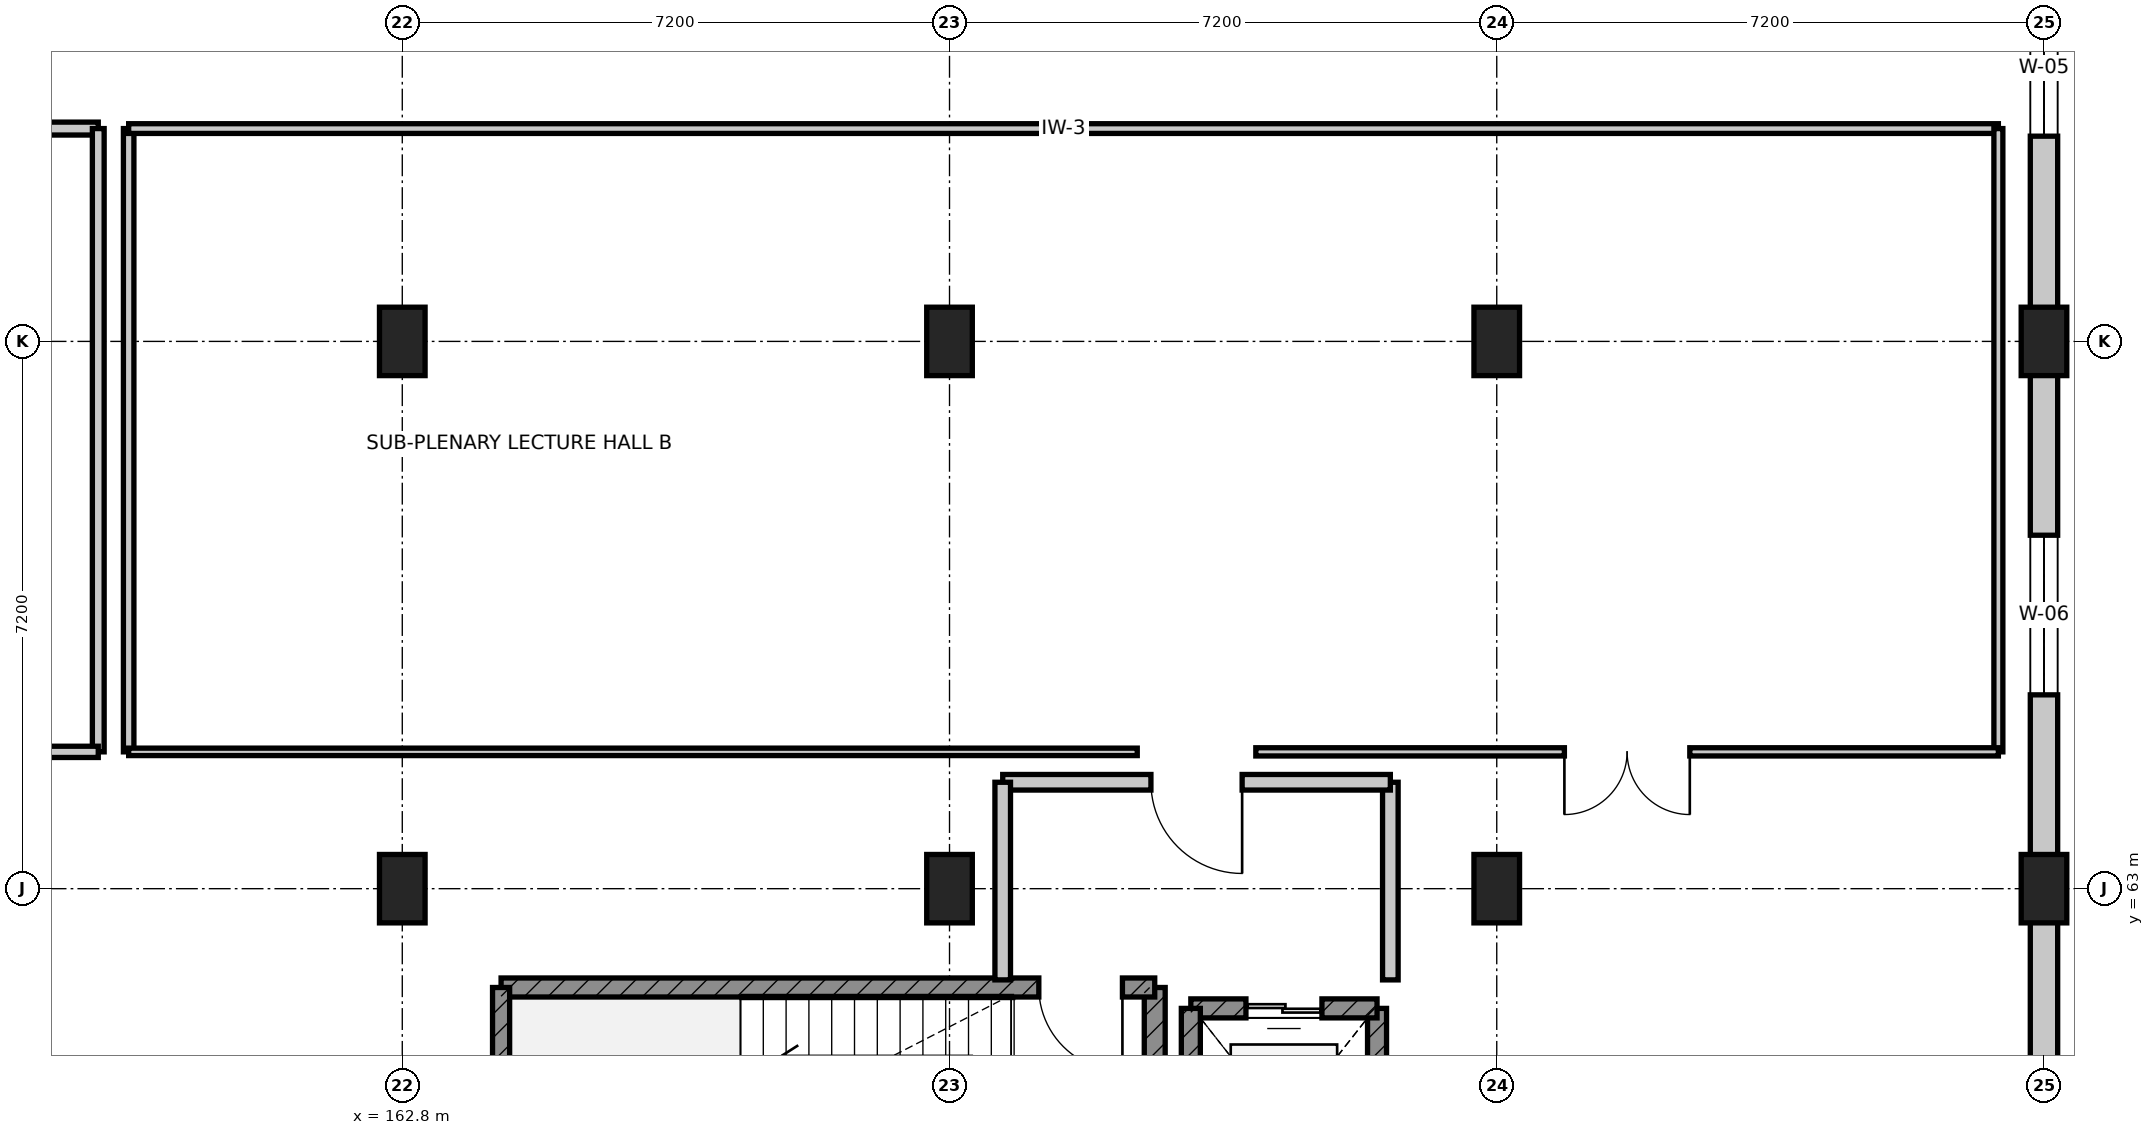
"""IFC4 building model, lengths in metres.
Left out: names, types, materials, properties, quantities, classifications, styles, units other than length and angle.
Written with IfcOpenShell. Run it as: python <this file> out.ifc"""

import sys

from ifc_helpers import new_model, si_unit, direction, frame, frame_2d, origin, origin_2d, place, context, subcontext, project, spatial, rectangle, extrude, element, fill, save


model = new_model("IFC4")
c1 = context("Model", 3, precision=1e-05, world=origin(), true_north=direction((0.0, 1.0)))
c2 = subcontext(c1, "Body", "Model", "MODEL_VIEW")
j1 = project(units=[si_unit("LENGTHUNIT", "METRE"), si_unit("PLANEANGLEUNIT", "RADIAN")], contexts=[c1])
p1 = place(None, origin())
s1 = spatial("IfcSite", under=j1, at=p1, CompositionType="ELEMENT")
p2 = place(p1, origin())
s2 = spatial("IfcBuilding", under=s1, at=p2, CompositionType="ELEMENT")
p3 = place(p2, frame((0.0, 0.0, 10.5)))
s3 = spatial("IfcBuildingStorey", under=s2, at=p3, CompositionType="ELEMENT", Elevation=10.5)
for number, where, z_axis, x_axis in (
    (1, (162.8, 63.0, 0.0), (0.0, 0.0, 1.0), (1.0, 0.0, 0.0)),
    (2, (162.8, 70.2, 0.0), (0.0, 0.0, 1.0), (1.0, 0.0, 0.0)),
    (3, (170.0, 63.0, 0.0), (0.0, 0.0, 1.0), (1.0, 0.0, 0.0)),
    (4, (170.0, 70.2, 0.0), (0.0, 0.0, 1.0), (1.0, 0.0, 0.0)),
    (5, (177.2, 63.0, 0.0), (0.0, 0.0, 1.0), (1.0, 0.0, 0.0)),
    (6, (177.2, 70.2, 0.0), (0.0, 0.0, 1.0), (1.0, 0.0, 0.0)),
    (7, (184.4, 63.0, 0.0), (0.0, 0.0, 1.0), (1.0, 0.0, 0.0)),
    (8, (184.4, 70.2, 0.0), (0.0, 0.0, 1.0), (1.0, 0.0, 0.0)),
):
    element("IfcColumn", number, at=place(p3, frame(where, z_axis=z_axis, x_axis=x_axis)), inside=s3, PredefinedType="COLUMN", context=c2, shape_type="SweptSolid", body=[
        extrude(rectangle(XDim=0.6, YDim=0.9, at=origin_2d()), origin(), (0.0, 0.0, 1.0), 4.5),
    ])
p4 = place(p3, frame((184.4, 77.4, 0.0), z_axis=(0.0, 0.0, 1.0), x_axis=(0.0, -1.0, 0.0)))
e9 = element("IfcWall", 9, at=p4, inside=s3, PredefinedType="STANDARD", context=c2, shape_type="SweptSolid", body=[
    extrude(rectangle(XDim=7.2, YDim=0.36, at=frame_2d((3.6, 0.0))), origin(), (0.0, 0.0, 1.0), 3.898),
])
p5 = place(p4, frame((2.7, 0.0, 0.9)))
e10 = element("IfcOpeningElement", 10, at=p5, cuts=e9, PredefinedType="OPENING", context=c2, shape_type="SweptSolid", body=[
    extrude(rectangle(XDim=1.8, YDim=1.8, at=frame_2d((0.9, 0.9))), frame((0.0, 0.19, 0.0), z_axis=(0.0, -1.0, 0.0), x_axis=(1.0, 0.0, 0.0)), (0.0, 0.0, 1.0), 0.38),
])
p6 = place(p3, frame((184.4, 70.2, 0.0), z_axis=(0.0, 0.0, 1.0), x_axis=(0.0, -1.0, 0.0)))
e11 = element("IfcWall", 11, at=p6, inside=s3, PredefinedType="STANDARD", context=c2, shape_type="SweptSolid", body=[
    extrude(rectangle(XDim=7.2, YDim=0.36, at=frame_2d((3.6, 0.0))), origin(), (0.0, 0.0, 1.0), 3.898),
])
p7 = place(p6, frame((2.55, 0.0, 0.9)))
e12 = element("IfcOpeningElement", 12, at=p7, cuts=e11, PredefinedType="OPENING", context=c2, shape_type="SweptSolid", body=[
    extrude(rectangle(XDim=2.1, YDim=1.8, at=frame_2d((1.05, 0.9))), frame((0.0, 0.19, 0.0), z_axis=(0.0, -1.0, 0.0), x_axis=(1.0, 0.0, 0.0)), (0.0, 0.0, 1.0), 0.38),
])
p8 = place(p3, frame((184.4, 63.0, 0.0), z_axis=(0.0, 0.0, 1.0), x_axis=(0.0, -1.0, 0.0)))
e13 = element("IfcWall", 13, at=p8, inside=s3, PredefinedType="STANDARD", context=c2, shape_type="SweptSolid", body=[
    extrude(rectangle(XDim=7.2, YDim=0.36, at=frame_2d((3.6, 0.0))), origin(), (0.0, 0.0, 1.0), 3.745),
])
p9 = place(p8, frame((2.4, 0.0, 0.9)))
e14 = element("IfcOpeningElement", 14, at=p9, cuts=e13, PredefinedType="OPENING", context=c2, shape_type="SweptSolid", body=[
    extrude(rectangle(XDim=2.4, YDim=1.8, at=frame_2d((1.2, 0.9))), frame((0.0, 0.19, 0.0), z_axis=(0.0, -1.0, 0.0), x_axis=(1.0, 0.0, 0.0)), (0.0, 0.0, 1.0), 0.38),
])
p10 = place(p3, frame((172.7, 58.1, 0.0), z_axis=(0.0, 0.0, 1.0), x_axis=(0.0, 1.0, 0.0)))
e15 = element("IfcWall", 15, at=p10, inside=s3, PredefinedType="SHEAR", context=c2, shape_type="SweptSolid", body=[
    extrude(rectangle(XDim=3.6, YDim=0.275, at=frame_2d((1.8, 0.0))), origin(), (0.0, 0.0, 1.0), 4.22),
])
p11 = place(p3, frame((172.7, 61.7, 0.0), z_axis=(0.0, 0.0, 1.0), x_axis=(-1.0, 0.0, 0.0)))
e16 = element("IfcWall", 16, at=p11, inside=s3, PredefinedType="SHEAR", context=c2, shape_type="SweptSolid", body=[
    extrude(rectangle(XDim=8.6, YDim=0.25, at=frame_2d((4.3, 0.0))), origin(), (0.0, 0.0, 1.0), 4.22),
])
p12 = place(p11, frame((0.425, 0.0, 0.0)))
e17 = element("IfcOpeningElement", 17, at=p12, cuts=e16, PredefinedType="OPENING", context=c2, shape_type="SweptSolid", body=[
    extrude(rectangle(XDim=1.1, YDim=2.1, at=frame_2d((0.55, 1.05))), frame((0.0, 0.135, 0.0), z_axis=(0.0, -1.0, 0.0), x_axis=(1.0, 0.0, 0.0)), (0.0, 0.0, 1.0), 0.27),
])
p13 = place(p3, frame((164.1, 61.7, 0.0), z_axis=(0.0, 0.0, 1.0), x_axis=(0.0, -1.0, 0.0)))
e18 = element("IfcWall", 18, at=p13, inside=s3, PredefinedType="SHEAR", context=c2, shape_type="SweptSolid", body=[
    extrude(rectangle(XDim=3.6, YDim=0.225, at=frame_2d((1.8, 0.0))), origin(), (0.0, 0.0, 1.0), 4.22),
])
p14 = place(p3, frame((175.625, 58.375, 0.0), z_axis=(0.0, 0.0, 1.0), x_axis=(0.0, 1.0, 0.0)))
e19 = element("IfcWall", 19, at=p14, inside=s3, PredefinedType="SHEAR", context=c2, shape_type="SweptSolid", body=[
    extrude(rectangle(XDim=3.05, YDim=0.25, at=frame_2d((1.525, 0.0))), origin(), (0.0, 0.0, 1.0), 4.22),
])
p15 = place(p3, frame((175.625, 61.425, 0.0), z_axis=(0.0, 0.0, 1.0), x_axis=(-1.0, 0.0, 0.0)))
e20 = element("IfcWall", 20, at=p15, inside=s3, PredefinedType="SHEAR", context=c2, shape_type="SweptSolid", body=[
    extrude(rectangle(XDim=2.45, YDim=0.25, at=frame_2d((1.225, 0.0))), origin(), (0.0, 0.0, 1.0), 4.22),
])
p16 = place(p15, frame((0.725, 0.0, 0.0)))
e21 = element("IfcOpeningElement", 21, at=p16, cuts=e20, PredefinedType="OPENING", context=c2, shape_type="SweptSolid", body=[
    extrude(rectangle(XDim=1.0, YDim=2.15, at=frame_2d((0.5, 1.075))), frame((0.0, 0.135, 0.0), z_axis=(0.0, -1.0, 0.0), x_axis=(1.0, 0.0, 0.0)), (0.0, 0.0, 1.0), 0.27),
])
p17 = place(p3, frame((173.175, 61.425, 0.0), z_axis=(0.0, 0.0, 1.0), x_axis=(0.0, -1.0, 0.0)))
e22 = element("IfcWall", 22, at=p17, inside=s3, PredefinedType="SHEAR", context=c2, shape_type="SweptSolid", body=[
    extrude(rectangle(XDim=3.05, YDim=0.25, at=frame_2d((1.525, 0.0))), origin(), (0.0, 0.0, 1.0), 4.22),
])
p18 = place(p3, frame((175.8, 61.8, 0.0), z_axis=(0.0, 0.0, 1.0), x_axis=(0.0, 1.0, 0.0)))
e23 = element("IfcWall", 23, at=p18, inside=s3, PredefinedType="PARTITIONING", context=c2, shape_type="SweptSolid", body=[
    extrude(rectangle(XDim=2.6, YDim=0.205, at=frame_2d((1.3, 0.0))), origin(), (0.0, 0.0, 1.0), 3.555),
])
p19 = place(p3, frame((175.8, 64.4, 0.0), z_axis=(0.0, 0.0, 1.0), x_axis=(-1.0, 0.0, 0.0)))
e24 = element("IfcWall", 24, at=p19, inside=s3, PredefinedType="PARTITIONING", context=c2, shape_type="SweptSolid", body=[
    extrude(rectangle(XDim=5.1, YDim=0.205, at=frame_2d((2.55, 0.0))), origin(), (0.0, 0.0, 1.0), 4.22),
])
p20 = place(p19, frame((1.95, 0.0, 0.0)))
e25 = element("IfcOpeningElement", 25, at=p20, cuts=e24, PredefinedType="OPENING", context=c2, shape_type="SweptSolid", body=[
    extrude(rectangle(XDim=1.2, YDim=2.1, at=frame_2d((0.6, 1.05))), frame((0.0, 0.113, 0.0), z_axis=(0.0, -1.0, 0.0), x_axis=(1.0, 0.0, 0.0)), (0.0, 0.0, 1.0), 0.225),
])
p21 = place(p3, frame((170.7, 64.4, 0.0), z_axis=(0.0, 0.0, 1.0), x_axis=(0.0, -1.0, 0.0)))
e26 = element("IfcWall", 26, at=p21, inside=s3, PredefinedType="PARTITIONING", context=c2, shape_type="SweptSolid", body=[
    extrude(rectangle(XDim=2.6, YDim=0.205, at=frame_2d((1.3, 0.0))), origin(), (0.0, 0.0, 1.0), 3.555),
])
p22 = place(p3, frame((134.2, 73.0, 0.0), z_axis=(0.0, 0.0, 1.0), x_axis=(1.0, 0.0, 0.0)))
e27 = element("IfcWall", 27, at=p22, inside=s3, PredefinedType="PARTITIONING", context=c2, shape_type="SweptSolid", body=[
    extrude(rectangle(XDim=24.6, YDim=0.17, at=frame_2d((12.3, 0.0))), origin(), (0.0, 0.0, 1.0), 3.796),
])
p23 = place(p3, frame((158.8, 73.0, 0.0), z_axis=(0.0, 0.0, 1.0), x_axis=(0.0, -1.0, 0.0)))
e28 = element("IfcWall", 28, at=p23, inside=s3, PredefinedType="PARTITIONING", context=c2, shape_type="SweptSolid", body=[
    extrude(rectangle(XDim=8.2, YDim=0.155, at=frame_2d((4.1, 0.0))), origin(), (0.0, 0.0, 1.0), 3.555),
])
p24 = place(p3, frame((158.8, 64.8, 0.0), z_axis=(0.0, 0.0, 1.0), x_axis=(-1.0, 0.0, 0.0)))
e29 = element("IfcWall", 29, at=p24, inside=s3, PredefinedType="PARTITIONING", context=c2, shape_type="SweptSolid", body=[
    extrude(rectangle(XDim=24.6, YDim=0.148, at=frame_2d((12.3, 0.0))), origin(), (0.0, 0.0, 1.0), 3.796),
])
p25 = place(p3, frame((159.2, 64.8, 0.0), z_axis=(0.0, 0.0, 1.0), x_axis=(0.0, 1.0, 0.0)))
e30 = element("IfcWall", 30, at=p25, inside=s3, PredefinedType="PARTITIONING", context=c2, shape_type="SweptSolid", body=[
    extrude(rectangle(XDim=8.2, YDim=0.138, at=frame_2d((4.1, 0.0))), origin(), (0.0, 0.0, 1.0), 3.555),
])
p26 = place(p3, frame((159.2, 73.0, 0.0), z_axis=(0.0, 0.0, 1.0), x_axis=(1.0, 0.0, 0.0)))
e31 = element("IfcWall", 31, at=p26, inside=s3, PredefinedType="PARTITIONING", context=c2, shape_type="SweptSolid", body=[
    extrude(rectangle(XDim=24.6, YDim=0.128, at=frame_2d((12.3, 0.0))), origin(), (0.0, 0.0, 1.0), 3.796),
])
p27 = place(p3, frame((183.8, 73.0, 0.0), z_axis=(0.0, 0.0, 1.0), x_axis=(0.0, -1.0, 0.0)))
e32 = element("IfcWall", 32, at=p27, inside=s3, PredefinedType="PARTITIONING", context=c2, shape_type="SweptSolid", body=[
    extrude(rectangle(XDim=8.2, YDim=0.118, at=frame_2d((4.1, 0.0))), origin(), (0.0, 0.0, 1.0), 3.555),
])
p28 = place(p3, frame((183.8, 64.8, 0.0), z_axis=(0.0, 0.0, 1.0), x_axis=(-1.0, 0.0, 0.0)))
e33 = element("IfcWall", 33, at=p28, inside=s3, PredefinedType="PARTITIONING", context=c2, shape_type="SweptSolid", body=[
    extrude(rectangle(XDim=9.77, YDim=0.108, at=frame_2d((4.885, 0.0))), origin(), (0.0, 0.0, 1.0), 3.796),
])
p29 = place(p28, frame((4.06, 0.0, 0.0)))
e34 = element("IfcOpeningElement", 34, at=p29, cuts=e33, PredefinedType="OPENING", context=c2, shape_type="SweptSolid", body=[
    extrude(rectangle(XDim=1.65, YDim=2.25, at=frame_2d((0.825, 1.125))), frame((0.0, 0.064, 0.0), z_axis=(0.0, -1.0, 0.0), x_axis=(1.0, 0.0, 0.0)), (0.0, 0.0, 1.0), 0.128),
])
p30 = place(p3, frame((172.47, 64.8, 0.0), z_axis=(0.0, 0.0, 1.0), x_axis=(-1.0, 0.0, 0.0)))
e35 = element("IfcWall", 35, at=p30, inside=s3, PredefinedType="PARTITIONING", context=c2, shape_type="SweptSolid", body=[
    extrude(rectangle(XDim=13.27, YDim=0.098, at=frame_2d((6.635, 0.0))), origin(), (0.0, 0.0, 1.0), 3.796),
])
p31 = place(p5, origin())
e36 = element("IfcWindow", 36, at=p31, inside=s3, PartitioningType="SINGLE_PANEL", PredefinedType="WINDOW", context=c2, shape_type="SweptSolid", body=[
    extrude(rectangle(XDim=1.8, YDim=1.8, at=frame_2d((0.9, 0.9))), frame((0.0, 0.03, 0.0), z_axis=(0.0, -1.0, 0.0), x_axis=(1.0, 0.0, 0.0)), (0.0, 0.0, 1.0), 0.06),
])
fill(e10, e36)
p32 = place(p7, origin())
e37 = element("IfcWindow", 37, at=p32, inside=s3, PartitioningType="SINGLE_PANEL", PredefinedType="WINDOW", context=c2, shape_type="SweptSolid", body=[
    extrude(rectangle(XDim=2.1, YDim=1.8, at=frame_2d((1.05, 0.9))), frame((0.0, 0.03, 0.0), z_axis=(0.0, -1.0, 0.0), x_axis=(1.0, 0.0, 0.0)), (0.0, 0.0, 1.0), 0.06),
])
fill(e12, e37)
p33 = place(p12, origin())
e38 = element("IfcDoor", 38, at=p33, inside=s3, OperationType="SINGLE_SWING_LEFT", PredefinedType="DOOR", context=c2, shape_type="SweptSolid", body=[
    extrude(rectangle(XDim=1.1, YDim=2.1, at=frame_2d((0.55, 1.05))), frame((0.0, 0.025, 0.0), z_axis=(0.0, -1.0, 0.0), x_axis=(1.0, 0.0, 0.0)), (0.0, 0.0, 1.0), 0.05),
])
fill(e17, e38)
p34 = place(p16, origin())
e39 = element("IfcDoor", 39, at=p34, inside=s3, OperationType="DOUBLE_DOOR_SLIDING", PredefinedType="DOOR", context=c2, shape_type="SweptSolid", body=[
    extrude(rectangle(XDim=1.0, YDim=2.15, at=frame_2d((0.5, 1.075))), frame((0.0, 0.025, 0.0), z_axis=(0.0, -1.0, 0.0), x_axis=(1.0, 0.0, 0.0)), (0.0, 0.0, 1.0), 0.05),
])
fill(e21, e39)
p35 = place(p20, origin())
e40 = element("IfcDoor", 40, at=p35, inside=s3, OperationType="SINGLE_SWING_LEFT", PredefinedType="DOOR", context=c2, shape_type="SweptSolid", body=[
    extrude(rectangle(XDim=1.2, YDim=2.1, at=frame_2d((0.6, 1.05))), frame((0.0, 0.025, 0.0), z_axis=(0.0, -1.0, 0.0), x_axis=(1.0, 0.0, 0.0)), (0.0, 0.0, 1.0), 0.05),
])
fill(e25, e40)
p36 = place(p29, origin())
e41 = element("IfcDoor", 41, at=p36, inside=s3, OperationType="DOUBLE_DOOR_SINGLE_SWING", PredefinedType="DOOR", context=c2, shape_type="SweptSolid", body=[
    extrude(rectangle(XDim=1.65, YDim=2.25, at=frame_2d((0.825, 1.125))), frame((0.0, 0.025, 0.0), z_axis=(0.0, -1.0, 0.0), x_axis=(1.0, 0.0, 0.0)), (0.0, 0.0, 1.0), 0.05),
])
fill(e34, e41)
save(model, sys.argv[1])
